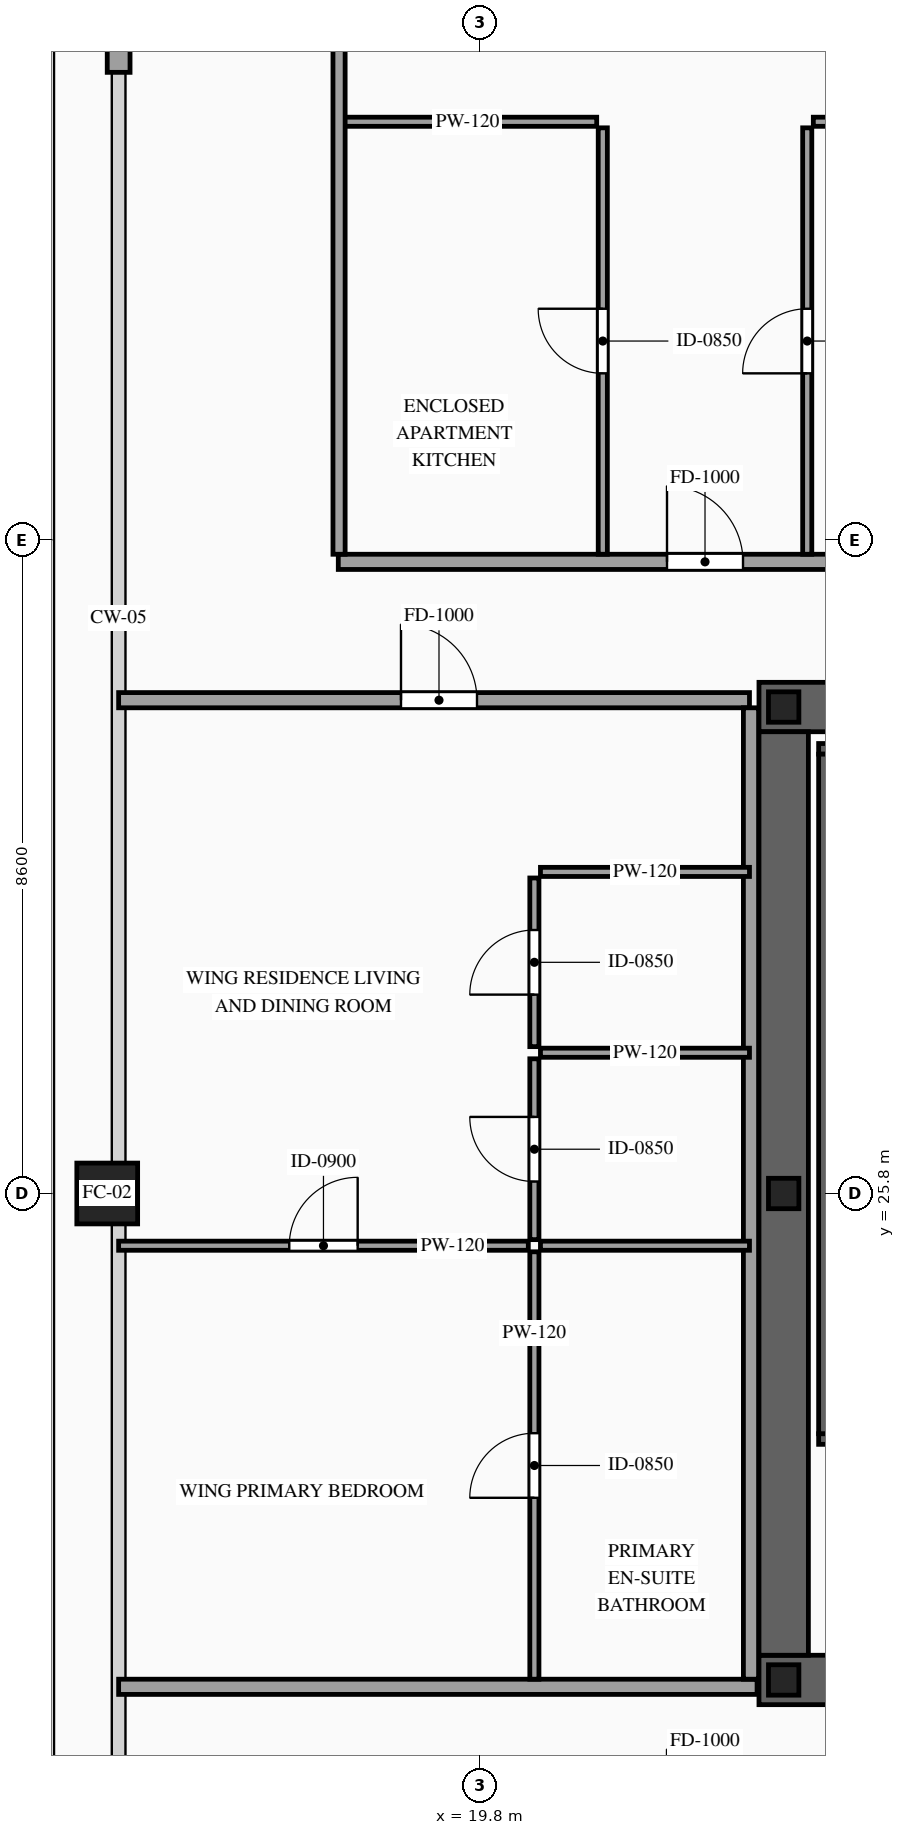
"""IFC4 building model, lengths in metres.
Left out: names, types, materials, properties, quantities, classifications, styles, units other than length and angle.
Written with IfcOpenShell. Run it as: python <this file> out.ifc"""

import sys

from ifc_helpers import new_model, si_unit, direction, frame, frame_2d, origin, origin_2d, place, context, subcontext, project, spatial, rectangle, hollow_rectangle, i_section, extrude, source, transform, mapped, element, fill, save


model = new_model("IFC4")
c1 = context("Model", 3, precision=1e-05, world=origin(), true_north=direction((0.0, 1.0)))
c2 = subcontext(c1, "Body", "Model", "MODEL_VIEW")
j1 = project(units=[si_unit("LENGTHUNIT", "METRE"), si_unit("PLANEANGLEUNIT", "RADIAN")], contexts=[c1])
p1 = place(None, origin())
s1 = spatial("IfcSite", under=j1, at=p1, CompositionType="ELEMENT")
p2 = place(p1, origin())
s2 = spatial("IfcBuilding", under=s1, at=p2, CompositionType="ELEMENT")
p3 = place(p2, frame((0.0, 0.0, 184.5)))
s3 = spatial("IfcBuildingStorey", under=s2, at=p3, CompositionType="ELEMENT", Elevation=184.5)
p4 = place(p3, frame((23.475, 19.4, 0.0), z_axis=(0.0, 0.0, 1.0), x_axis=(1.0, 0.0, 0.0)))
e1 = element("IfcWall", 1, at=p4, inside=s3, PredefinedType="SHEAR", context=c2, shape_type="SweptSolid", body=[
    extrude(rectangle(XDim=27.05, YDim=0.65, at=frame_2d((13.525, 0.0))), origin(), (0.0, 0.0, 1.0), 3.5),
])
p5 = place(p4, frame((1.975, 0.0, 0.0)))
e2 = element("IfcOpeningElement", 2, at=p5, cuts=e1, PredefinedType="OPENING", context=c2, shape_type="SweptSolid", body=[
    extrude(rectangle(XDim=1.1, YDim=2.2, at=frame_2d((0.55, 1.1))), frame((0.0, 0.34, 0.0), z_axis=(0.0, -1.0, 0.0), x_axis=(1.0, 0.0, 0.0)), (0.0, 0.0, 1.0), 0.68),
])
p6 = place(p4, frame((9.875, 0.0, 0.0)))
e3 = element("IfcOpeningElement", 3, at=p6, cuts=e1, PredefinedType="OPENING", context=c2, shape_type="SweptSolid", body=[
    extrude(rectangle(XDim=1.1, YDim=2.2, at=frame_2d((0.55, 1.1))), frame((0.0, 0.34, 0.0), z_axis=(0.0, -1.0, 0.0), x_axis=(1.0, 0.0, 0.0)), (0.0, 0.0, 1.0), 0.68),
])
p7 = place(p4, frame((23.075, 0.0, 0.0)))
e4 = element("IfcOpeningElement", 4, at=p7, cuts=e1, PredefinedType="OPENING", context=c2, shape_type="SweptSolid", body=[
    extrude(rectangle(XDim=1.1, YDim=2.2, at=frame_2d((0.55, 1.1))), frame((0.0, 0.34, 0.0), z_axis=(0.0, -1.0, 0.0), x_axis=(1.0, 0.0, 0.0)), (0.0, 0.0, 1.0), 0.68),
])
p8 = place(p4, frame((19.695, 0.0, 0.0)))
e5 = element("IfcOpeningElement", 5, at=p8, cuts=e1, PredefinedType="OPENING", context=c2, shape_type="SweptSolid", body=[
    extrude(rectangle(XDim=0.9, YDim=2.15, at=frame_2d((0.45, 1.075))), frame((0.0, 0.34, 0.0), z_axis=(0.0, -1.0, 0.0), x_axis=(1.0, 0.0, 0.0)), (0.0, 0.0, 1.0), 0.68),
])
p9 = place(p4, frame((18.255, 0.0, 0.0)))
e6 = element("IfcOpeningElement", 6, at=p9, cuts=e1, PredefinedType="OPENING", context=c2, shape_type="SweptSolid", body=[
    extrude(rectangle(XDim=0.9, YDim=2.15, at=frame_2d((0.45, 1.075))), frame((0.0, 0.34, 0.0), z_axis=(0.0, -1.0, 0.0), x_axis=(1.0, 0.0, 0.0)), (0.0, 0.0, 1.0), 0.68),
])
p10 = place(p3, frame((23.475, 32.2, 0.0), z_axis=(0.0, 0.0, 1.0), x_axis=(1.0, 0.0, 0.0)))
e7 = element("IfcWall", 7, at=p10, inside=s3, PredefinedType="SHEAR", context=c2, shape_type="SweptSolid", body=[
    extrude(rectangle(XDim=27.05, YDim=0.65, at=frame_2d((13.525, 0.0))), origin(), (0.0, 0.0, 1.0), 3.5),
])
p11 = place(p10, frame((4.595, 0.0, 0.0)))
e8 = element("IfcOpeningElement", 8, at=p11, cuts=e7, PredefinedType="OPENING", context=c2, shape_type="SweptSolid", body=[
    extrude(rectangle(XDim=0.9, YDim=2.15, at=frame_2d((0.45, 1.075))), frame((0.0, 0.34, 0.0), z_axis=(0.0, -1.0, 0.0), x_axis=(1.0, 0.0, 0.0)), (0.0, 0.0, 1.0), 0.68),
])
p12 = place(p10, frame((9.875, 0.0, 0.0)))
e9 = element("IfcOpeningElement", 9, at=p12, cuts=e7, PredefinedType="OPENING", context=c2, shape_type="SweptSolid", body=[
    extrude(rectangle(XDim=1.1, YDim=2.2, at=frame_2d((0.55, 1.1))), frame((0.0, 0.34, 0.0), z_axis=(0.0, -1.0, 0.0), x_axis=(1.0, 0.0, 0.0)), (0.0, 0.0, 1.0), 0.68),
])
p13 = place(p10, frame((15.725, 0.0, 0.0)))
e10 = element("IfcOpeningElement", 10, at=p13, cuts=e7, PredefinedType="OPENING", context=c2, shape_type="SweptSolid", body=[
    extrude(rectangle(XDim=1.1, YDim=2.2, at=frame_2d((0.55, 1.1))), frame((0.0, 0.34, 0.0), z_axis=(0.0, -1.0, 0.0), x_axis=(1.0, 0.0, 0.0)), (0.0, 0.0, 1.0), 0.68),
])
p14 = place(p10, frame((19.695, 0.0, 0.0)))
e11 = element("IfcOpeningElement", 11, at=p14, cuts=e7, PredefinedType="OPENING", context=c2, shape_type="SweptSolid", body=[
    extrude(rectangle(XDim=0.9, YDim=2.15, at=frame_2d((0.45, 1.075))), frame((0.0, 0.34, 0.0), z_axis=(0.0, -1.0, 0.0), x_axis=(1.0, 0.0, 0.0)), (0.0, 0.0, 1.0), 0.68),
])
m1 = source(origin(), c2, "Body", "SweptSolid", [
    extrude(rectangle(XDim=12.15, YDim=0.65, at=frame_2d((6.075, 0.0))), origin(), (0.0, 0.0, 1.0), 3.5),
])
p15 = place(p3, frame((23.8, 19.725, 0.0), z_axis=(0.0, 0.0, 1.0), x_axis=(0.0, 1.0, 0.0)))
e12 = element("IfcWall", 12, at=p15, inside=s3, PredefinedType="SHEAR", context=c2, shape_type="MappedRepresentation", body=[
    mapped(m1, transform((0.0, 0.0, 0.0), scale=1.0)),
])
m2 = source(origin(), c2, "Body", "SweptSolid", [
    extrude(i_section(OverallWidth=0.4, OverallDepth=0.4, WebThickness=0.013, FlangeThickness=0.021, at=origin_2d()), origin(), (0.0, 0.0, 1.0), 3.5),
])
for number, where, z_axis, x_axis in (
    (13, (23.8, 19.4, 0.0), (0.0, 0.0, 1.0), (1.0, 0.0, 0.0)),
    (14, (23.8, 25.8, 0.0), (0.0, 0.0, 1.0), (1.0, 0.0, 0.0)),
    (15, (23.8, 32.2, 0.0), (0.0, 0.0, 1.0), (1.0, 0.0, 0.0)),
):
    element("IfcColumn", number, at=place(p3, frame(where, z_axis=z_axis, x_axis=x_axis)), inside=s3, PredefinedType="COLUMN", context=c2, shape_type="MappedRepresentation", body=[
        mapped(m2, transform((0.0, 0.0, 0.0), scale=1.0)),
    ])
m3 = source(origin(), c2, "Body", "SweptSolid", [
    extrude(hollow_rectangle(XDim=0.8, YDim=0.8, WallThickness=0.036, at=origin_2d()), origin(), (0.0, 0.0, 1.0), 3.5),
])
p16 = place(p3, frame((14.9, 25.8, 0.0), z_axis=(0.0, 0.0, 1.0), x_axis=(1.0, 0.0, 0.0)))
e16 = element("IfcColumn", 16, at=p16, inside=s3, PredefinedType="COLUMN", context=c2, shape_type="MappedRepresentation", body=[
    mapped(m3, transform((0.0, 0.0, 0.0), scale=1.0)),
])
m4 = source(origin(), c2, "Body", "SweptSolid", [
    extrude(rectangle(XDim=3.05, YDim=0.3, at=frame_2d((1.525, 0.0))), origin(), (0.0, 0.0, 1.0), 2.835),
])
p17 = place(p3, frame((15.05, 40.55, 0.0), z_axis=(0.0, 0.0, 1.0), x_axis=(0.0, 1.0, 0.0)))
e17 = element("IfcWall", 17, at=p17, inside=s3, PredefinedType="SOLIDWALL", context=c2, shape_type="MappedRepresentation", body=[
    mapped(m4, transform((0.0, 0.0, 0.0), scale=1.0)),
])
p18 = place(p3, frame((24.26, 22.57, 0.0), z_axis=(0.0, 0.0, 1.0), x_axis=(1.0, 0.0, 0.0)))
e18 = element("IfcWall", 18, at=p18, inside=s3, PredefinedType="SOLIDWALL", context=c2, shape_type="SweptSolid", body=[
    extrude(rectangle(XDim=3.28, YDim=0.14, at=frame_2d((1.64, 0.0))), origin(), (0.0, 0.0, 1.0), 3.28),
])
p19 = place(p18, frame((1.09, 0.0, 0.0)))
e19 = element("IfcOpeningElement", 19, at=p19, cuts=e18, PredefinedType="OPENING", context=c2, shape_type="SweptSolid", body=[
    extrude(rectangle(XDim=1.1, YDim=2.2, at=frame_2d((0.55, 1.1))), frame((0.0, 0.085, 0.0), z_axis=(0.0, -1.0, 0.0), x_axis=(1.0, 0.0, 0.0)), (0.0, 0.0, 1.0), 0.17),
])
m5 = source(origin(), c2, "Body", "SweptSolid", [
    extrude(rectangle(XDim=3.28, YDim=0.14, at=frame_2d((1.64, 0.0))), origin(), (0.0, 0.0, 1.0), 3.28),
])
p20 = place(p3, frame((24.26, 31.65, 0.0), z_axis=(0.0, 0.0, 1.0), x_axis=(1.0, 0.0, 0.0)))
e20 = element("IfcWall", 20, at=p20, inside=s3, PredefinedType="SOLIDWALL", context=c2, shape_type="MappedRepresentation", body=[
    mapped(m5, transform((0.0, 0.0, 0.0), scale=1.0)),
])
m6 = source(origin(), c2, "Body", "SweptSolid", [
    extrude(rectangle(XDim=8.94, YDim=0.14, at=frame_2d((4.47, 0.0))), origin(), (0.0, 0.0, 1.0), 3.28),
])
p21 = place(p3, frame((24.33, 22.64, 0.0), z_axis=(0.0, 0.0, 1.0), x_axis=(0.0, 1.0, 0.0)))
e21 = element("IfcWall", 21, at=p21, inside=s3, PredefinedType="SOLIDWALL", context=c2, shape_type="MappedRepresentation", body=[
    mapped(m6, transform((0.0, 0.0, 0.0), scale=1.0)),
])
p22 = place(p3, frame((17.94, 34.11, 0.0), z_axis=(0.0, 0.0, 1.0), x_axis=(1.0, 0.0, 0.0)))
e22 = element("IfcWall", 22, at=p22, inside=s3, PredefinedType="PARTITIONING", context=c2, shape_type="SweptSolid", body=[
    extrude(rectangle(XDim=9.45, YDim=0.2, at=frame_2d((4.725, 0.0))), origin(), (0.0, 0.0, 1.0), 3.28),
])
p23 = place(p22, frame((4.325, 0.0, 0.0)))
e23 = element("IfcOpeningElement", 23, at=p23, cuts=e22, PredefinedType="OPENING", context=c2, shape_type="SweptSolid", body=[
    extrude(rectangle(XDim=1.0, YDim=2.2, at=frame_2d((0.5, 1.1))), frame((0.0, 0.115, 0.0), z_axis=(0.0, -1.0, 0.0), x_axis=(1.0, 0.0, 0.0)), (0.0, 0.0, 1.0), 0.23),
])
m7 = source(origin(), c2, "Body", "SweptSolid", [
    extrude(rectangle(XDim=3.4, YDim=0.12, at=frame_2d((1.7, 0.0))), origin(), (0.0, 0.0, 1.0), 3.28),
])
p24 = place(p3, frame((17.94, 39.9, 0.0), z_axis=(0.0, 0.0, 1.0), x_axis=(1.0, 0.0, 0.0)))
e24 = element("IfcWall", 24, at=p24, inside=s3, PredefinedType="PARTITIONING", context=c2, shape_type="MappedRepresentation", body=[
    mapped(m7, transform((0.0, 0.0, 0.0), scale=1.0)),
])
p25 = place(p3, frame((21.42, 34.21, 0.0), z_axis=(0.0, 0.0, 1.0), x_axis=(0.0, 1.0, 0.0)))
e25 = element("IfcWall", 25, at=p25, inside=s3, PredefinedType="PARTITIONING", context=c2, shape_type="SweptSolid", body=[
    extrude(rectangle(XDim=5.61, YDim=0.12, at=frame_2d((2.805, 0.0))), origin(), (0.0, 0.0, 1.0), 3.28),
])
p26 = place(p25, frame((2.38, 0.0, 0.0)))
e26 = element("IfcOpeningElement", 26, at=p26, cuts=e25, PredefinedType="OPENING", context=c2, shape_type="SweptSolid", body=[
    extrude(rectangle(XDim=0.85, YDim=2.1, at=frame_2d((0.425, 1.05))), frame((0.0, 0.075, 0.0), z_axis=(0.0, -1.0, 0.0), x_axis=(1.0, 0.0, 0.0)), (0.0, 0.0, 1.0), 0.15),
])
m8 = source(origin(), c2, "Body", "SweptSolid", [
    extrude(rectangle(XDim=3.2, YDim=0.12, at=frame_2d((1.6, 0.0))), origin(), (0.0, 0.0, 1.0), 2.875),
])
p27 = place(p3, frame((24.19, 39.9, 0.0), z_axis=(0.0, 0.0, 1.0), x_axis=(1.0, 0.0, 0.0)))
e27 = element("IfcWall", 27, at=p27, inside=s3, PredefinedType="PARTITIONING", context=c2, shape_type="MappedRepresentation", body=[
    mapped(m8, transform((0.0, 0.0, 0.0), scale=1.0)),
])
p28 = place(p3, frame((24.11, 34.21, 0.0), z_axis=(0.0, 0.0, 1.0), x_axis=(0.0, 1.0, 0.0)))
e28 = element("IfcWall", 28, at=p28, inside=s3, PredefinedType="PARTITIONING", context=c2, shape_type="SweptSolid", body=[
    extrude(rectangle(XDim=5.61, YDim=0.12, at=frame_2d((2.805, 0.0))), origin(), (0.0, 0.0, 1.0), 3.28),
])
p29 = place(p28, frame((2.38, 0.0, 0.0)))
e29 = element("IfcOpeningElement", 29, at=p29, cuts=e28, PredefinedType="OPENING", context=c2, shape_type="SweptSolid", body=[
    extrude(rectangle(XDim=0.85, YDim=2.1, at=frame_2d((0.425, 1.05))), frame((0.0, 0.075, 0.0), z_axis=(0.0, -1.0, 0.0), x_axis=(1.0, 0.0, 0.0)), (0.0, 0.0, 1.0), 0.15),
])
m9 = source(origin(), c2, "Body", "SweptSolid", [
    extrude(rectangle(XDim=13.39, YDim=0.16, at=frame_2d((6.695, 0.0))), origin(), (0.0, 0.0, 1.0), 3.28),
])
p30 = place(p3, frame((17.95, 34.21, 0.0), z_axis=(0.0, 0.0, 1.0), x_axis=(0.0, 1.0, 0.0)))
e30 = element("IfcWall", 30, at=p30, inside=s3, PredefinedType="PARTITIONING", context=c2, shape_type="MappedRepresentation", body=[
    mapped(m9, transform((0.0, 0.0, 0.0), scale=1.0)),
])
p31 = place(p3, frame((15.05, 32.29, 0.0), z_axis=(0.0, 0.0, 1.0), x_axis=(1.0, 0.0, 0.0)))
e31 = element("IfcWall", 31, at=p31, inside=s3, PredefinedType="PARTITIONING", context=c2, shape_type="SweptSolid", body=[
    extrude(rectangle(XDim=8.3, YDim=0.2, at=frame_2d((4.15, 0.0))), origin(), (0.0, 0.0, 1.0), 2.775),
])
p32 = place(p31, frame((3.715, 0.0, 0.0)))
e32 = element("IfcOpeningElement", 32, at=p32, cuts=e31, PredefinedType="OPENING", context=c2, shape_type="SweptSolid", body=[
    extrude(rectangle(XDim=1.0, YDim=2.2, at=frame_2d((0.5, 1.1))), frame((0.0, 0.115, 0.0), z_axis=(0.0, -1.0, 0.0), x_axis=(1.0, 0.0, 0.0)), (0.0, 0.0, 1.0), 0.23),
])
m10 = source(origin(), c2, "Body", "SweptSolid", [
    extrude(rectangle(XDim=8.4, YDim=0.2, at=frame_2d((4.2, 0.0))), origin(), (0.0, 0.0, 1.0), 2.775),
])
p33 = place(p3, frame((15.05, 19.31, 0.0), z_axis=(0.0, 0.0, 1.0), x_axis=(1.0, 0.0, 0.0)))
e33 = element("IfcWall", 33, at=p33, inside=s3, PredefinedType="PARTITIONING", context=c2, shape_type="MappedRepresentation", body=[
    mapped(m10, transform((0.0, 0.0, 0.0), scale=1.0)),
])
m11 = source(origin(), c2, "Body", "SweptSolid", [
    extrude(rectangle(XDim=12.78, YDim=0.2, at=frame_2d((6.39, 0.0))), origin(), (0.0, 0.0, 1.0), 3.28),
])
p34 = place(p3, frame((23.37, 19.41, 0.0), z_axis=(0.0, 0.0, 1.0), x_axis=(0.0, 1.0, 0.0)))
e34 = element("IfcWall", 34, at=p34, inside=s3, PredefinedType="PARTITIONING", context=c2, shape_type="MappedRepresentation", body=[
    mapped(m11, transform((0.0, 0.0, 0.0), scale=1.0)),
])
m12 = source(origin(), c2, "Body", "SweptSolid", [
    extrude(rectangle(XDim=2.75, YDim=0.12, at=frame_2d((1.375, 0.0))), origin(), (0.0, 0.0, 1.0), 3.28),
])
for number, where, z_axis, x_axis in (
    (35, (20.6, 25.113, 0.0), (0.0, 0.0, 1.0), (1.0, 0.0, 0.0)),
    (36, (20.6, 27.652, 0.0), (0.0, 0.0, 1.0), (1.0, 0.0, 0.0)),
):
    element("IfcWall", number, at=place(p3, frame(where, z_axis=z_axis, x_axis=x_axis)), inside=s3, PredefinedType="PARTITIONING", context=c2, shape_type="MappedRepresentation", body=[
        mapped(m12, transform((0.0, 0.0, 0.0), scale=1.0)),
    ])
p35 = place(p3, frame((20.52, 25.193, 0.0), z_axis=(0.0, 0.0, 1.0), x_axis=(0.0, 1.0, 0.0)))
e37 = element("IfcWall", 37, at=p35, inside=s3, PredefinedType="PARTITIONING", context=c2, shape_type="SweptSolid", body=[
    extrude(rectangle(XDim=2.379, YDim=0.12, at=frame_2d((1.189, 0.0))), origin(), (0.0, 0.0, 1.0), 3.28),
])
p36 = place(p35, frame((0.764, 0.0, 0.0)))
e38 = element("IfcOpeningElement", 38, at=p36, cuts=e37, PredefinedType="OPENING", context=c2, shape_type="SweptSolid", body=[
    extrude(rectangle(XDim=0.85, YDim=2.1, at=frame_2d((0.425, 1.05))), frame((0.0, 0.075, 0.0), z_axis=(0.0, -1.0, 0.0), x_axis=(1.0, 0.0, 0.0)), (0.0, 0.0, 1.0), 0.15),
])
p37 = place(p3, frame((20.6, 30.031, 0.0), z_axis=(0.0, 0.0, 1.0), x_axis=(1.0, 0.0, 0.0)))
e39 = element("IfcWall", 39, at=p37, inside=s3, PredefinedType="PARTITIONING", context=c2, shape_type="MappedRepresentation", body=[
    mapped(m12, transform((0.0, 0.0, 0.0), scale=1.0)),
])
p38 = place(p3, frame((20.52, 27.732, 0.0), z_axis=(0.0, 0.0, 1.0), x_axis=(0.0, 1.0, 0.0)))
e40 = element("IfcWall", 40, at=p38, inside=s3, PredefinedType="PARTITIONING", context=c2, shape_type="SweptSolid", body=[
    extrude(rectangle(XDim=2.219, YDim=0.12, at=frame_2d((1.109, 0.0))), origin(), (0.0, 0.0, 1.0), 3.28),
])
p39 = place(p38, frame((0.685, 0.0, 0.0)))
e41 = element("IfcOpeningElement", 41, at=p39, cuts=e40, PredefinedType="OPENING", context=c2, shape_type="SweptSolid", body=[
    extrude(rectangle(XDim=0.85, YDim=2.1, at=frame_2d((0.425, 1.05))), frame((0.0, 0.075, 0.0), z_axis=(0.0, -1.0, 0.0), x_axis=(1.0, 0.0, 0.0)), (0.0, 0.0, 1.0), 0.15),
])
p40 = place(p3, frame((15.05, 25.113, 0.0), z_axis=(0.0, 0.0, 1.0), x_axis=(1.0, 0.0, 0.0)))
e42 = element("IfcWall", 42, at=p40, inside=s3, PredefinedType="PARTITIONING", context=c2, shape_type="SweptSolid", body=[
    extrude(rectangle(XDim=5.39, YDim=0.12, at=frame_2d((2.695, 0.0))), origin(), (0.0, 0.0, 1.0), 3.28),
])
p41 = place(p40, frame((2.245, 0.0, 0.0)))
e43 = element("IfcOpeningElement", 43, at=p41, cuts=e42, PredefinedType="OPENING", context=c2, shape_type="SweptSolid", body=[
    extrude(rectangle(XDim=0.9, YDim=2.15, at=frame_2d((0.45, 1.075))), frame((0.0, 0.075, 0.0), z_axis=(0.0, -1.0, 0.0), x_axis=(1.0, 0.0, 0.0)), (0.0, 0.0, 1.0), 0.15),
])
p42 = place(p3, frame((20.52, 19.41, 0.0), z_axis=(0.0, 0.0, 1.0), x_axis=(0.0, 1.0, 0.0)))
e44 = element("IfcWall", 44, at=p42, inside=s3, PredefinedType="PARTITIONING", context=c2, shape_type="SweptSolid", body=[
    extrude(rectangle(XDim=5.623, YDim=0.12, at=frame_2d((2.812, 0.0))), origin(), (0.0, 0.0, 1.0), 3.28),
])
p43 = place(p42, frame((2.386, 0.0, 0.0)))
e45 = element("IfcOpeningElement", 45, at=p43, cuts=e44, PredefinedType="OPENING", context=c2, shape_type="SweptSolid", body=[
    extrude(rectangle(XDim=0.85, YDim=2.1, at=frame_2d((0.425, 1.05))), frame((0.0, 0.075, 0.0), z_axis=(0.0, -1.0, 0.0), x_axis=(1.0, 0.0, 0.0)), (0.0, 0.0, 1.0), 0.15),
])
m13 = source(origin(), c2, "Body", "SweptSolid", [
    extrude(rectangle(XDim=1.0, YDim=2.2, at=frame_2d((0.5, 1.1))), frame((0.0, 0.025, 0.0), z_axis=(0.0, -1.0, 0.0), x_axis=(1.0, 0.0, 0.0)), (0.0, 0.0, 1.0), 0.05),
])
p44 = place(p23, origin())
e46 = element("IfcDoor", 46, at=p44, inside=s3, OperationType="SINGLE_SWING_LEFT", PredefinedType="DOOR", context=c2, shape_type="MappedRepresentation", body=[
    mapped(m13, transform((0.0, 0.0, 0.0), scale=1.0)),
])
fill(e23, e46)
m14 = source(origin(), c2, "Body", "SweptSolid", [
    extrude(rectangle(XDim=0.85, YDim=2.1, at=frame_2d((0.425, 1.05))), frame((0.0, 0.025, 0.0), z_axis=(0.0, -1.0, 0.0), x_axis=(1.0, 0.0, 0.0)), (0.0, 0.0, 1.0), 0.05),
])
p45 = place(p26, origin())
e47 = element("IfcDoor", 47, at=p45, inside=s3, OperationType="SINGLE_SWING_RIGHT", PredefinedType="DOOR", context=c2, shape_type="MappedRepresentation", body=[
    mapped(m14, transform((0.0, 0.0, 0.0), scale=1.0)),
])
fill(e26, e47)
p46 = place(p29, origin())
e48 = element("IfcDoor", 48, at=p46, inside=s3, OperationType="SINGLE_SWING_LEFT", PredefinedType="DOOR", context=c2, shape_type="MappedRepresentation", body=[
    mapped(m14, transform((0.0, 0.0, 0.0), scale=1.0)),
])
fill(e29, e48)
p47 = place(p32, origin())
e49 = element("IfcDoor", 49, at=p47, inside=s3, OperationType="SINGLE_SWING_LEFT", PredefinedType="DOOR", context=c2, shape_type="MappedRepresentation", body=[
    mapped(m13, transform((0.0, 0.0, 0.0), scale=1.0)),
])
fill(e32, e49)
p48 = place(p36, origin())
e50 = element("IfcDoor", 50, at=p48, inside=s3, OperationType="SINGLE_SWING_RIGHT", PredefinedType="DOOR", context=c2, shape_type="MappedRepresentation", body=[
    mapped(m14, transform((0.0, 0.0, 0.0), scale=1.0)),
])
fill(e38, e50)
p49 = place(p39, origin())
e51 = element("IfcDoor", 51, at=p49, inside=s3, OperationType="SINGLE_SWING_LEFT", PredefinedType="DOOR", context=c2, shape_type="MappedRepresentation", body=[
    mapped(m14, transform((0.0, 0.0, 0.0), scale=1.0)),
])
fill(e41, e51)
m15 = source(origin(), c2, "Body", "SweptSolid", [
    extrude(rectangle(XDim=0.9, YDim=2.15, at=frame_2d((0.45, 1.075))), frame((0.0, 0.025, 0.0), z_axis=(0.0, -1.0, 0.0), x_axis=(1.0, 0.0, 0.0)), (0.0, 0.0, 1.0), 0.05),
])
p50 = place(p41, origin())
e52 = element("IfcDoor", 52, at=p50, inside=s3, OperationType="SINGLE_SWING_RIGHT", PredefinedType="DOOR", context=c2, shape_type="MappedRepresentation", body=[
    mapped(m15, transform((0.0, 0.0, 0.0), scale=1.0)),
])
fill(e43, e52)
p51 = place(p43, origin())
e53 = element("IfcDoor", 53, at=p51, inside=s3, OperationType="SINGLE_SWING_LEFT", PredefinedType="DOOR", context=c2, shape_type="MappedRepresentation", body=[
    mapped(m14, transform((0.0, 0.0, 0.0), scale=1.0)),
])
fill(e45, e53)
save(model, sys.argv[1])
